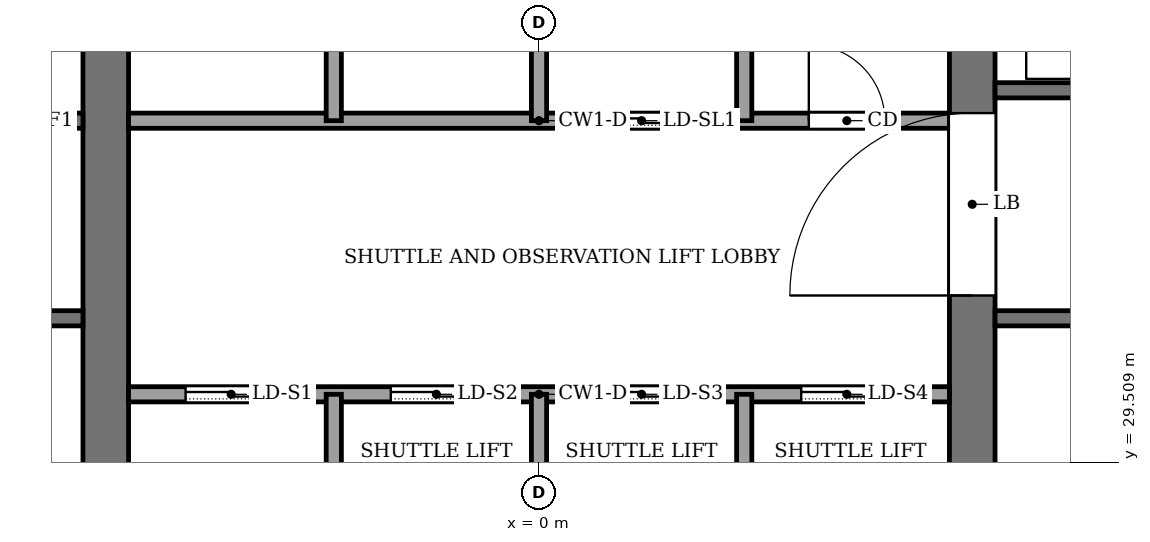
"""IFC4 building model, lengths in metres.
Left out: names, types, materials, properties, quantities, classifications, styles, units other than length and angle.
Written with IfcOpenShell. Run it as: python <this file> out.ifc"""

import sys

from ifc_helpers import new_model, si_unit, direction, frame, frame_2d, origin, place, context, subcontext, project, spatial, rectangle, extrude, element, fill, save


model = new_model("IFC4")
c1 = context("Model", 3, precision=1e-05, world=origin(), true_north=direction((0.0, 1.0)))
c2 = subcontext(c1, "Body", "Model", "MODEL_VIEW")
j1 = project(units=[si_unit("LENGTHUNIT", "METRE"), si_unit("PLANEANGLEUNIT", "RADIAN")], contexts=[c1])
p1 = place(None, origin())
s1 = spatial("IfcSite", under=j1, at=p1, CompositionType="ELEMENT")
p2 = place(p1, origin())
s2 = spatial("IfcBuilding", under=s1, at=p2, CompositionType="ELEMENT")
p3 = place(p2, frame((0.0, 0.0, 177.0)))
s3 = spatial("IfcBuildingStorey", under=s2, at=p3, CompositionType="ELEMENT", Elevation=177.0)
p4 = place(p3, frame((-5.7, 18.4, -0.13), z_axis=(0.0, 0.0, 1.0), x_axis=(0.0, 1.0, 0.0)))
e1 = element("IfcWall", 1, at=p4, inside=s3, PredefinedType="SHEAR", context=c2, shape_type="SweptSolid", body=[
    extrude(rectangle(XDim=19.2, YDim=0.6, at=frame_2d((9.6, 0.0))), origin(), (0.0, 0.0, 1.0), 5.0),
])
p5 = place(p4, frame((8.35, 0.0, 0.13)))
e2 = element("IfcOpeningElement", 2, at=p5, cuts=e1, PredefinedType="OPENING", context=c2, shape_type="SweptSolid", body=[
    extrude(rectangle(XDim=0.9, YDim=2.1, at=frame_2d((0.45, 1.05))), frame((0.0, 0.31, 0.0), z_axis=(0.0, -1.0, 0.0), x_axis=(1.0, 0.0, 0.0)), (0.0, 0.0, 1.0), 0.62),
])
p6 = place(p3, frame((5.7, 18.4, -0.13), z_axis=(0.0, 0.0, 1.0), x_axis=(0.0, 1.0, 0.0)))
e3 = element("IfcWall", 3, at=p6, inside=s3, PredefinedType="SHEAR", context=c2, shape_type="SweptSolid", body=[
    extrude(rectangle(XDim=19.2, YDim=0.6, at=frame_2d((9.6, 0.0))), origin(), (0.0, 0.0, 1.0), 5.0),
])
p7 = place(p6, frame((13.3, 0.0, 0.13)))
e4 = element("IfcOpeningElement", 4, at=p7, cuts=e3, PredefinedType="OPENING", context=c2, shape_type="SweptSolid", body=[
    extrude(rectangle(XDim=2.4, YDim=2.4, at=frame_2d((1.2, 1.2))), frame((0.0, 0.31, 0.0), z_axis=(0.0, -1.0, 0.0), x_axis=(1.0, 0.0, 0.0)), (0.0, 0.0, 1.0), 0.62),
])
p8 = place(p3, frame((-5.4, 30.4, 0.0), z_axis=(0.0, 0.0, 1.0), x_axis=(1.0, 0.0, 0.0)))
e5 = element("IfcWall", 5, at=p8, inside=s3, PredefinedType="PARTITIONING", context=c2, shape_type="SweptSolid", body=[
    extrude(rectangle(XDim=10.8, YDim=0.2, at=frame_2d((5.4, 0.0))), origin(), (0.0, 0.0, 1.0), 4.87),
])
p9 = place(p8, frame((0.75, 0.0, 0.0)))
e6 = element("IfcOpeningElement", 6, at=p9, cuts=e5, PredefinedType="OPENING", context=c2, shape_type="SweptSolid", body=[
    extrude(rectangle(XDim=1.2, YDim=2.2, at=frame_2d((0.6, 1.1))), frame((0.0, 0.11, 0.0), z_axis=(0.0, -1.0, 0.0), x_axis=(1.0, 0.0, 0.0)), (0.0, 0.0, 1.0), 0.22),
])
p10 = place(p8, frame((3.45, 0.0, 0.0)))
e7 = element("IfcOpeningElement", 7, at=p10, cuts=e5, PredefinedType="OPENING", context=c2, shape_type="SweptSolid", body=[
    extrude(rectangle(XDim=1.2, YDim=2.2, at=frame_2d((0.6, 1.1))), frame((0.0, 0.11, 0.0), z_axis=(0.0, -1.0, 0.0), x_axis=(1.0, 0.0, 0.0)), (0.0, 0.0, 1.0), 0.22),
])
p11 = place(p8, frame((6.15, 0.0, 0.0)))
e8 = element("IfcOpeningElement", 8, at=p11, cuts=e5, PredefinedType="OPENING", context=c2, shape_type="SweptSolid", body=[
    extrude(rectangle(XDim=1.2, YDim=2.2, at=frame_2d((0.6, 1.1))), frame((0.0, 0.11, 0.0), z_axis=(0.0, -1.0, 0.0), x_axis=(1.0, 0.0, 0.0)), (0.0, 0.0, 1.0), 0.22),
])
p12 = place(p8, frame((8.85, 0.0, 0.0)))
e9 = element("IfcOpeningElement", 9, at=p12, cuts=e5, PredefinedType="OPENING", context=c2, shape_type="SweptSolid", body=[
    extrude(rectangle(XDim=1.2, YDim=2.2, at=frame_2d((0.6, 1.1))), frame((0.0, 0.11, 0.0), z_axis=(0.0, -1.0, 0.0), x_axis=(1.0, 0.0, 0.0)), (0.0, 0.0, 1.0), 0.22),
])
p13 = place(p3, frame((-12.6, 31.4, 0.0), z_axis=(0.0, 0.0, 1.0), x_axis=(1.0, 0.0, 0.0)))
e10 = element("IfcWall", 10, at=p13, inside=s3, PredefinedType="PARTITIONING", context=c2, shape_type="SweptSolid", body=[
    extrude(rectangle(XDim=6.6, YDim=0.2, at=frame_2d((3.3, 0.0))), origin(), (0.0, 0.0, 1.0), 4.87),
])
p14 = place(p13, frame((1.0, 0.0, 0.0)))
e11 = element("IfcOpeningElement", 11, at=p14, cuts=e10, PredefinedType="OPENING", context=c2, shape_type="SweptSolid", body=[
    extrude(rectangle(XDim=1.2, YDim=2.2, at=frame_2d((0.6, 1.1))), frame((0.0, 0.11, 0.0), z_axis=(0.0, -1.0, 0.0), x_axis=(1.0, 0.0, 0.0)), (0.0, 0.0, 1.0), 0.22),
])
p15 = place(p3, frame((6.0, 31.4, 0.0), z_axis=(0.0, 0.0, 1.0), x_axis=(1.0, 0.0, 0.0)))
e12 = element("IfcWall", 12, at=p15, inside=s3, PredefinedType="PARTITIONING", context=c2, shape_type="SweptSolid", body=[
    extrude(rectangle(XDim=6.6, YDim=0.2, at=frame_2d((3.3, 0.0))), origin(), (0.0, 0.0, 1.0), 4.87),
])
p16 = place(p3, frame((-12.6, 34.0, 0.0), z_axis=(0.0, 0.0, 1.0), x_axis=(1.0, 0.0, 0.0)))
e13 = element("IfcWall", 13, at=p16, inside=s3, PredefinedType="PARTITIONING", context=c2, shape_type="SweptSolid", body=[
    extrude(rectangle(XDim=6.6, YDim=0.2, at=frame_2d((3.3, 0.0))), origin(), (0.0, 0.0, 1.0), 4.87),
])
p17 = place(p16, frame((4.7, 0.0, 0.0)))
e14 = element("IfcOpeningElement", 14, at=p17, cuts=e13, PredefinedType="OPENING", context=c2, shape_type="SweptSolid", body=[
    extrude(rectangle(XDim=1.4, YDim=2.2, at=frame_2d((0.7, 1.1))), frame((0.0, 0.11, 0.0), z_axis=(0.0, -1.0, 0.0), x_axis=(1.0, 0.0, 0.0)), (0.0, 0.0, 1.0), 0.22),
])
p18 = place(p16, frame((2.3, 0.0, 0.0)))
e15 = element("IfcOpeningElement", 15, at=p18, cuts=e13, PredefinedType="OPENING", context=c2, shape_type="SweptSolid", body=[
    extrude(rectangle(XDim=1.4, YDim=2.2, at=frame_2d((0.7, 1.1))), frame((0.0, 0.11, 0.0), z_axis=(0.0, -1.0, 0.0), x_axis=(1.0, 0.0, 0.0)), (0.0, 0.0, 1.0), 0.22),
])
p19 = place(p16, frame((0.45, 0.0, 0.0)))
e16 = element("IfcOpeningElement", 16, at=p19, cuts=e13, PredefinedType="OPENING", context=c2, shape_type="SweptSolid", body=[
    extrude(rectangle(XDim=0.9, YDim=2.1, at=frame_2d((0.45, 1.05))), frame((0.0, 0.11, 0.0), z_axis=(0.0, -1.0, 0.0), x_axis=(1.0, 0.0, 0.0)), (0.0, 0.0, 1.0), 0.22),
])
p20 = place(p3, frame((-5.4, 34.0, 0.0), z_axis=(0.0, 0.0, 1.0), x_axis=(1.0, 0.0, 0.0)))
e17 = element("IfcWall", 17, at=p20, inside=s3, PredefinedType="PARTITIONING", context=c2, shape_type="SweptSolid", body=[
    extrude(rectangle(XDim=10.8, YDim=0.2, at=frame_2d((5.4, 0.0))), origin(), (0.0, 0.0, 1.0), 4.87),
])
p21 = place(p20, frame((6.15, 0.0, 0.0)))
e18 = element("IfcOpeningElement", 18, at=p21, cuts=e17, PredefinedType="OPENING", context=c2, shape_type="SweptSolid", body=[
    extrude(rectangle(XDim=1.2, YDim=2.2, at=frame_2d((0.6, 1.1))), frame((0.0, 0.11, 0.0), z_axis=(0.0, -1.0, 0.0), x_axis=(1.0, 0.0, 0.0)), (0.0, 0.0, 1.0), 0.22),
])
p22 = place(p20, frame((8.95, 0.0, 0.0)))
e19 = element("IfcOpeningElement", 19, at=p22, cuts=e17, PredefinedType="OPENING", context=c2, shape_type="SweptSolid", body=[
    extrude(rectangle(XDim=1.0, YDim=2.1, at=frame_2d((0.5, 1.05))), frame((0.0, 0.11, 0.0), z_axis=(0.0, -1.0, 0.0), x_axis=(1.0, 0.0, 0.0)), (0.0, 0.0, 1.0), 0.22),
])
p23 = place(p3, frame((6.0, 34.4, 0.0), z_axis=(0.0, 0.0, 1.0), x_axis=(1.0, 0.0, 0.0)))
e20 = element("IfcWall", 20, at=p23, inside=s3, PredefinedType="PARTITIONING", context=c2, shape_type="SweptSolid", body=[
    extrude(rectangle(XDim=6.6, YDim=0.2, at=frame_2d((3.3, 0.0))), origin(), (0.0, 0.0, 1.0), 4.87),
])
p24 = place(p23, frame((4.8, 0.0, 0.0)))
e21 = element("IfcOpeningElement", 21, at=p24, cuts=e20, PredefinedType="OPENING", context=c2, shape_type="SweptSolid", body=[
    extrude(rectangle(XDim=1.2, YDim=2.2, at=frame_2d((0.6, 1.1))), frame((0.0, 0.11, 0.0), z_axis=(0.0, -1.0, 0.0), x_axis=(1.0, 0.0, 0.0)), (0.0, 0.0, 1.0), 0.22),
])
p25 = place(p3, frame((-2.7, 28.0, 0.0), z_axis=(0.0, 0.0, 1.0), x_axis=(0.0, 1.0, 0.0)))
e22 = element("IfcWall", 22, at=p25, inside=s3, PredefinedType="PARTITIONING", context=c2, shape_type="SweptSolid", body=[
    extrude(rectangle(XDim=2.4, YDim=0.2, at=frame_2d((1.2, 0.0))), origin(), (0.0, 0.0, 1.0), 4.87),
])
p26 = place(p3, frame((-2.7, 34.0, 0.0), z_axis=(0.0, 0.0, 1.0), x_axis=(0.0, 1.0, 0.0)))
e23 = element("IfcWall", 23, at=p26, inside=s3, PredefinedType="PARTITIONING", context=c2, shape_type="SweptSolid", body=[
    extrude(rectangle(XDim=3.6, YDim=0.2, at=frame_2d((1.8, 0.0))), origin(), (0.0, 0.0, 1.0), 4.87),
])
p27 = place(p3, frame((0.0, 28.0, 0.0), z_axis=(0.0, 0.0, 1.0), x_axis=(0.0, 1.0, 0.0)))
e24 = element("IfcWall", 24, at=p27, inside=s3, PredefinedType="PARTITIONING", context=c2, shape_type="SweptSolid", body=[
    extrude(rectangle(XDim=2.4, YDim=0.2, at=frame_2d((1.2, 0.0))), origin(), (0.0, 0.0, 1.0), 4.87),
])
p28 = place(p3, frame((0.0, 34.0, 0.0), z_axis=(0.0, 0.0, 1.0), x_axis=(0.0, 1.0, 0.0)))
e25 = element("IfcWall", 25, at=p28, inside=s3, PredefinedType="PARTITIONING", context=c2, shape_type="SweptSolid", body=[
    extrude(rectangle(XDim=3.6, YDim=0.2, at=frame_2d((1.8, 0.0))), origin(), (0.0, 0.0, 1.0), 4.87),
])
p29 = place(p3, frame((2.7, 28.0, 0.0), z_axis=(0.0, 0.0, 1.0), x_axis=(0.0, 1.0, 0.0)))
e26 = element("IfcWall", 26, at=p29, inside=s3, PredefinedType="PARTITIONING", context=c2, shape_type="SweptSolid", body=[
    extrude(rectangle(XDim=2.4, YDim=0.2, at=frame_2d((1.2, 0.0))), origin(), (0.0, 0.0, 1.0), 4.87),
])
p30 = place(p3, frame((2.7, 34.0, 0.0), z_axis=(0.0, 0.0, 1.0), x_axis=(0.0, 1.0, 0.0)))
e27 = element("IfcWall", 27, at=p30, inside=s3, PredefinedType="PARTITIONING", context=c2, shape_type="SweptSolid", body=[
    extrude(rectangle(XDim=3.6, YDim=0.2, at=frame_2d((1.8, 0.0))), origin(), (0.0, 0.0, 1.0), 4.87),
])
p31 = place(p9, origin())
e28 = element("IfcDoor", 28, at=p31, inside=s3, OperationType="SLIDING_TO_LEFT", PredefinedType="DOOR", context=c2, shape_type="SweptSolid", body=[
    extrude(rectangle(XDim=1.2, YDim=2.2, at=frame_2d((0.6, 1.1))), frame((0.0, 0.025, 0.0), z_axis=(0.0, -1.0, 0.0), x_axis=(1.0, 0.0, 0.0)), (0.0, 0.0, 1.0), 0.05),
])
fill(e6, e28)
p32 = place(p10, origin())
e29 = element("IfcDoor", 29, at=p32, inside=s3, OperationType="SLIDING_TO_LEFT", PredefinedType="DOOR", context=c2, shape_type="SweptSolid", body=[
    extrude(rectangle(XDim=1.2, YDim=2.2, at=frame_2d((0.6, 1.1))), frame((0.0, 0.025, 0.0), z_axis=(0.0, -1.0, 0.0), x_axis=(1.0, 0.0, 0.0)), (0.0, 0.0, 1.0), 0.05),
])
fill(e7, e29)
p33 = place(p11, origin())
e30 = element("IfcDoor", 30, at=p33, inside=s3, OperationType="SLIDING_TO_LEFT", PredefinedType="DOOR", context=c2, shape_type="SweptSolid", body=[
    extrude(rectangle(XDim=1.2, YDim=2.2, at=frame_2d((0.6, 1.1))), frame((0.0, 0.025, 0.0), z_axis=(0.0, -1.0, 0.0), x_axis=(1.0, 0.0, 0.0)), (0.0, 0.0, 1.0), 0.05),
])
fill(e8, e30)
p34 = place(p12, origin())
e31 = element("IfcDoor", 31, at=p34, inside=s3, OperationType="SLIDING_TO_LEFT", PredefinedType="DOOR", context=c2, shape_type="SweptSolid", body=[
    extrude(rectangle(XDim=1.2, YDim=2.2, at=frame_2d((0.6, 1.1))), frame((0.0, 0.025, 0.0), z_axis=(0.0, -1.0, 0.0), x_axis=(1.0, 0.0, 0.0)), (0.0, 0.0, 1.0), 0.05),
])
fill(e9, e31)
p35 = place(p21, origin())
e32 = element("IfcDoor", 32, at=p35, inside=s3, OperationType="SLIDING_TO_LEFT", PredefinedType="DOOR", context=c2, shape_type="SweptSolid", body=[
    extrude(rectangle(XDim=1.2, YDim=2.2, at=frame_2d((0.6, 1.1))), frame((0.0, 0.025, 0.0), z_axis=(0.0, -1.0, 0.0), x_axis=(1.0, 0.0, 0.0)), (0.0, 0.0, 1.0), 0.05),
])
fill(e18, e32)
p36 = place(p22, origin())
e33 = element("IfcDoor", 33, at=p36, inside=s3, OperationType="SINGLE_SWING_LEFT", PredefinedType="DOOR", context=c2, shape_type="SweptSolid", body=[
    extrude(rectangle(XDim=1.0, YDim=2.1, at=frame_2d((0.5, 1.05))), frame((0.0, 0.025, 0.0), z_axis=(0.0, -1.0, 0.0), x_axis=(1.0, 0.0, 0.0)), (0.0, 0.0, 1.0), 0.05),
])
fill(e19, e33)
p37 = place(p7, origin())
e34 = element("IfcDoor", 34, at=p37, inside=s3, OperationType="DOUBLE_DOOR_SINGLE_SWING", PredefinedType="DOOR", context=c2, shape_type="SweptSolid", body=[
    extrude(rectangle(XDim=2.4, YDim=2.4, at=frame_2d((1.2, 1.2))), frame((0.0, 0.025, 0.0), z_axis=(0.0, -1.0, 0.0), x_axis=(1.0, 0.0, 0.0)), (0.0, 0.0, 1.0), 0.05),
])
fill(e4, e34)
save(model, sys.argv[1])
